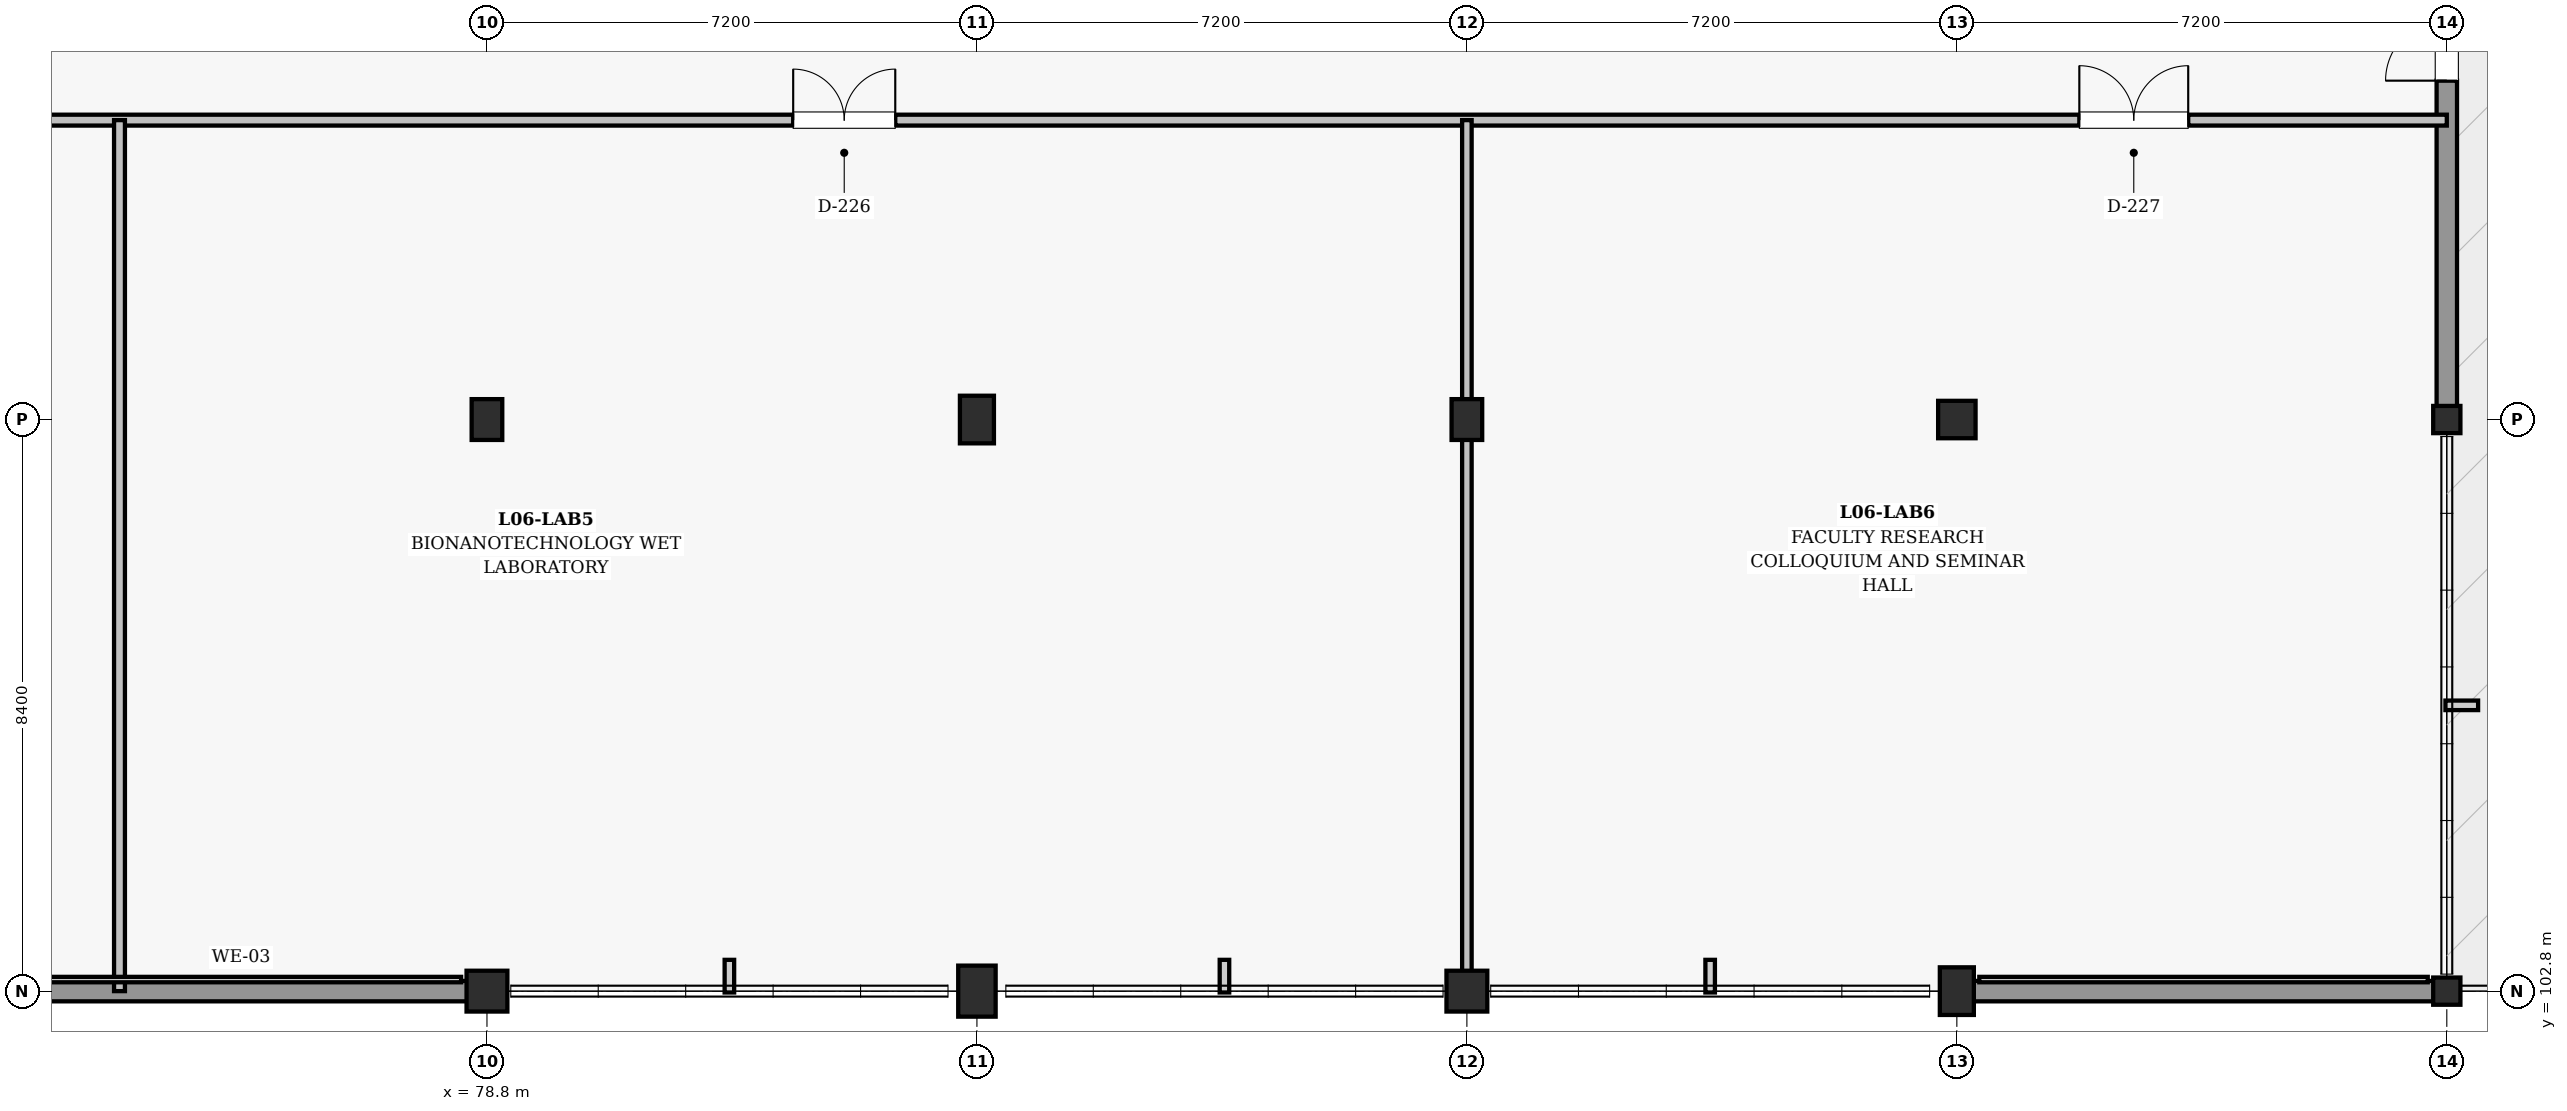
"""IFC4 building model, lengths in metres.
Left out: names, types, materials, properties, quantities, classifications, styles, units other than length and angle.
Written with IfcOpenShell. Run it as: python <this file> out.ifc"""

import sys

from ifc_helpers import new_model, si_unit, direction, frame, frame_2d, origin, origin_2d, place, context, subcontext, project, spatial, rectangle, extrude, element, fill, save


model = new_model("IFC4")
c1 = context("Model", 3, precision=1e-05, world=origin(), true_north=direction((0.0, 1.0)))
c2 = subcontext(c1, "Body", "Model", "MODEL_VIEW")
j1 = project(units=[si_unit("LENGTHUNIT", "METRE"), si_unit("PLANEANGLEUNIT", "RADIAN")], contexts=[c1])
p1 = place(None, origin())
s1 = spatial("IfcSite", under=j1, at=p1, CompositionType="ELEMENT")
p2 = place(p1, origin())
s2 = spatial("IfcBuilding", under=s1, at=p2, CompositionType="ELEMENT")
p3 = place(p2, frame((0.0, 0.0, 27.9)))
s3 = spatial("IfcBuildingStorey", under=s2, at=p3, CompositionType="ELEMENT", Elevation=27.9)
p4 = place(p3, frame((78.8, 102.8, 0.0), z_axis=(0.0, 0.0, 1.0), x_axis=(1.0, 0.0, 0.0)))
e1 = element("IfcColumn", 1, at=p4, inside=s3, PredefinedType="COLUMN", context=c2, shape_type="SweptSolid", body=[
    extrude(rectangle(XDim=0.6, YDim=0.6, at=origin_2d()), origin(), (0.0, 0.0, 1.0), 4.5),
])
p5 = place(p3, frame((78.8, 111.2, 0.0), z_axis=(0.0, 0.0, 1.0), x_axis=(1.0, 0.0, 0.0)))
e2 = element("IfcColumn", 2, at=p5, inside=s3, PredefinedType="COLUMN", context=c2, shape_type="SweptSolid", body=[
    extrude(rectangle(XDim=0.45, YDim=0.6, at=origin_2d()), origin(), (0.0, 0.0, 1.0), 4.5),
])
p6 = place(p3, frame((86.0, 102.8, 0.0), z_axis=(0.0, 0.0, 1.0), x_axis=(1.0, 0.0, 0.0)))
e3 = element("IfcColumn", 3, at=p6, inside=s3, PredefinedType="COLUMN", context=c2, shape_type="SweptSolid", body=[
    extrude(rectangle(XDim=0.55, YDim=0.75, at=origin_2d()), origin(), (0.0, 0.0, 1.0), 4.5),
])
p7 = place(p3, frame((86.0, 111.2, 0.0), z_axis=(0.0, 0.0, 1.0), x_axis=(1.0, 0.0, 0.0)))
e4 = element("IfcColumn", 4, at=p7, inside=s3, PredefinedType="COLUMN", context=c2, shape_type="SweptSolid", body=[
    extrude(rectangle(XDim=0.5, YDim=0.7, at=origin_2d()), origin(), (0.0, 0.0, 1.0), 4.5),
])
p8 = place(p3, frame((93.2, 102.8, 0.0), z_axis=(0.0, 0.0, 1.0), x_axis=(1.0, 0.0, 0.0)))
e5 = element("IfcColumn", 5, at=p8, inside=s3, PredefinedType="COLUMN", context=c2, shape_type="SweptSolid", body=[
    extrude(rectangle(XDim=0.6, YDim=0.6, at=origin_2d()), origin(), (0.0, 0.0, 1.0), 4.5),
])
p9 = place(p3, frame((93.2, 111.2, 0.0), z_axis=(0.0, 0.0, 1.0), x_axis=(1.0, 0.0, 0.0)))
e6 = element("IfcColumn", 6, at=p9, inside=s3, PredefinedType="COLUMN", context=c2, shape_type="SweptSolid", body=[
    extrude(rectangle(XDim=0.45, YDim=0.6, at=origin_2d()), origin(), (0.0, 0.0, 1.0), 4.5),
])
p10 = place(p3, frame((100.4, 102.8, 0.0), z_axis=(0.0, 0.0, 1.0), x_axis=(1.0, 0.0, 0.0)))
e7 = element("IfcColumn", 7, at=p10, inside=s3, PredefinedType="COLUMN", context=c2, shape_type="SweptSolid", body=[
    extrude(rectangle(XDim=0.5, YDim=0.7, at=origin_2d()), origin(), (0.0, 0.0, 1.0), 4.5),
])
p11 = place(p3, frame((100.4, 111.2, 0.0), z_axis=(0.0, 0.0, 1.0), x_axis=(1.0, 0.0, 0.0)))
e8 = element("IfcColumn", 8, at=p11, inside=s3, PredefinedType="COLUMN", context=c2, shape_type="SweptSolid", body=[
    extrude(rectangle(XDim=0.55, YDim=0.55, at=origin_2d()), origin(), (0.0, 0.0, 1.0), 4.5),
])
for number, where, z_axis, x_axis in (
    (9, (107.6, 102.8, 0.0), (0.0, 0.0, 1.0), (1.0, 0.0, 0.0)),
    (10, (107.6, 111.2, 0.0), (0.0, 0.0, 1.0), (1.0, 0.0, 0.0)),
):
    element("IfcColumn", number, at=place(p3, frame(where, z_axis=z_axis, x_axis=x_axis)), inside=s3, PredefinedType="COLUMN", context=c2, shape_type="SweptSolid", body=[
        extrude(rectangle(XDim=0.4, YDim=0.4, at=origin_2d()), origin(), (0.0, 0.0, 1.0), 4.5),
    ])
p12 = place(p3, frame((71.855, 102.8, 0.0), z_axis=(0.0, 0.0, 1.0), x_axis=(1.0, 0.0, 0.0)))
e11 = element("IfcWall", 11, at=p12, inside=s3, PredefinedType="SOLIDWALL", context=c2, shape_type="SweptSolid", body=[
    extrude(rectangle(XDim=6.665, YDim=0.3, at=frame_2d((3.333, 0.0))), origin(), (0.0, 0.0, 1.0), 2.955),
])
p13 = place(p3, frame((100.63, 102.8, 0.0), z_axis=(0.0, 0.0, 1.0), x_axis=(1.0, 0.0, 0.0)))
e12 = element("IfcWall", 12, at=p13, inside=s3, PredefinedType="SOLIDWALL", context=c2, shape_type="SweptSolid", body=[
    extrude(rectangle(XDim=6.79, YDim=0.3, at=frame_2d((3.395, 0.0))), origin(), (0.0, 0.0, 1.0), 2.955),
])
p14 = place(p3, frame((107.6, 111.38, 0.0), z_axis=(0.0, 0.0, 1.0), x_axis=(0.0, 1.0, 0.0)))
e13 = element("IfcWall", 13, at=p14, inside=s3, PredefinedType="SOLIDWALL", context=c2, shape_type="SweptSolid", body=[
    extrude(rectangle(XDim=8.015, YDim=0.3, at=frame_2d((4.008, 0.0))), origin(), (0.0, 0.0, 1.0), 2.955),
])
p15 = place(p14, frame((4.8, 0.0, 0.0)))
e14 = element("IfcOpeningElement", 14, at=p15, cuts=e13, PredefinedType="OPENING", context=c2, shape_type="SweptSolid", body=[
    extrude(rectangle(XDim=1.8, YDim=2.3, at=frame_2d((0.9, 1.15))), frame((0.0, 0.16, 0.0), z_axis=(0.0, -1.0, 0.0), x_axis=(1.0, 0.0, 0.0)), (0.0, 0.0, 1.0), 0.32),
])
p16 = place(p3, frame((14.0, 115.6, 0.0), z_axis=(0.0, 0.0, 1.0), x_axis=(1.0, 0.0, 0.0)))
e15 = element("IfcWall", 15, at=p16, inside=s3, PredefinedType="PARTITIONING", context=c2, shape_type="SweptSolid", body=[
    extrude(rectangle(XDim=93.6, YDim=0.16, at=frame_2d((46.8, 0.0))), origin(), (0.0, 0.0, 1.0), 2.96),
])
p17 = place(p16, frame((29.9, 0.0, 0.0)))
e16 = element("IfcOpeningElement", 16, at=p17, cuts=e15, PredefinedType="OPENING", context=c2, shape_type="SweptSolid", body=[
    extrude(rectangle(XDim=1.0, YDim=2.15, at=frame_2d((0.5, 1.075))), frame((0.0, 0.09, 0.0), z_axis=(0.0, -1.0, 0.0), x_axis=(1.0, 0.0, 0.0)), (0.0, 0.0, 1.0), 0.18),
])
p18 = place(p16, frame((10.1, 0.0, 0.0)))
e17 = element("IfcOpeningElement", 17, at=p18, cuts=e15, PredefinedType="OPENING", context=c2, shape_type="SweptSolid", body=[
    extrude(rectangle(XDim=1.5, YDim=2.25, at=frame_2d((0.75, 1.125))), frame((0.0, 0.09, 0.0), z_axis=(0.0, -1.0, 0.0), x_axis=(1.0, 0.0, 0.0)), (0.0, 0.0, 1.0), 0.18),
])
p19 = place(p16, frame((24.5, 0.0, 0.0)))
e18 = element("IfcOpeningElement", 18, at=p19, cuts=e15, PredefinedType="OPENING", context=c2, shape_type="SweptSolid", body=[
    extrude(rectangle(XDim=1.18, YDim=2.2, at=frame_2d((0.59, 1.1))), frame((0.0, 0.09, 0.0), z_axis=(0.0, -1.0, 0.0), x_axis=(1.0, 0.0, 0.0)), (0.0, 0.0, 1.0), 0.18),
])
p20 = place(p16, frame((38.7, 0.0, 0.0)))
e19 = element("IfcOpeningElement", 19, at=p20, cuts=e15, PredefinedType="OPENING", context=c2, shape_type="SweptSolid", body=[
    extrude(rectangle(XDim=1.5, YDim=2.25, at=frame_2d((0.75, 1.125))), frame((0.0, 0.09, 0.0), z_axis=(0.0, -1.0, 0.0), x_axis=(1.0, 0.0, 0.0)), (0.0, 0.0, 1.0), 0.18),
])
p21 = place(p16, frame((52.4, 0.0, 0.0)))
e20 = element("IfcOpeningElement", 20, at=p21, cuts=e15, PredefinedType="OPENING", context=c2, shape_type="SweptSolid", body=[
    extrude(rectangle(XDim=1.5, YDim=2.25, at=frame_2d((0.75, 1.125))), frame((0.0, 0.09, 0.0), z_axis=(0.0, -1.0, 0.0), x_axis=(1.0, 0.0, 0.0)), (0.0, 0.0, 1.0), 0.18),
])
p22 = place(p16, frame((69.3, 0.0, 0.0)))
e21 = element("IfcOpeningElement", 21, at=p22, cuts=e15, PredefinedType="OPENING", context=c2, shape_type="SweptSolid", body=[
    extrude(rectangle(XDim=1.5, YDim=2.25, at=frame_2d((0.75, 1.125))), frame((0.0, 0.09, 0.0), z_axis=(0.0, -1.0, 0.0), x_axis=(1.0, 0.0, 0.0)), (0.0, 0.0, 1.0), 0.18),
])
p23 = place(p16, frame((88.2, 0.0, 0.0)))
e22 = element("IfcOpeningElement", 22, at=p23, cuts=e15, PredefinedType="OPENING", context=c2, shape_type="SweptSolid", body=[
    extrude(rectangle(XDim=1.6, YDim=2.25, at=frame_2d((0.8, 1.125))), frame((0.0, 0.09, 0.0), z_axis=(0.0, -1.0, 0.0), x_axis=(1.0, 0.0, 0.0)), (0.0, 0.0, 1.0), 0.18),
])
p24 = place(p3, frame((73.4, 102.8, 0.0), z_axis=(0.0, 0.0, 1.0), x_axis=(0.0, 1.0, 0.0)))
e23 = element("IfcWall", 23, at=p24, inside=s3, PredefinedType="PARTITIONING", context=c2, shape_type="SweptSolid", body=[
    extrude(rectangle(XDim=12.8, YDim=0.16, at=frame_2d((6.4, 0.0))), origin(), (0.0, 0.0, 1.0), 3.36),
])
p25 = place(p3, frame((93.2, 102.8, 0.0), z_axis=(0.0, 0.0, 1.0), x_axis=(0.0, 1.0, 0.0)))
e24 = element("IfcWall", 24, at=p25, inside=s3, PredefinedType="PARTITIONING", context=c2, shape_type="SweptSolid", body=[
    extrude(rectangle(XDim=12.8, YDim=0.14, at=frame_2d((6.4, 0.0))), origin(), (0.0, 0.0, 1.0), 3.36),
])
p26 = place(p15, origin())
e25 = element("IfcDoor", 25, at=p26, inside=s3, OperationType="DOUBLE_DOOR_SINGLE_SWING", PredefinedType="DOOR", context=c2, shape_type="SweptSolid", body=[
    extrude(rectangle(XDim=1.8, YDim=2.3, at=frame_2d((0.9, 1.15))), frame((0.0, 0.025, 0.0), z_axis=(0.0, -1.0, 0.0), x_axis=(1.0, 0.0, 0.0)), (0.0, 0.0, 1.0), 0.05),
])
fill(e14, e25)
p27 = place(p22, origin())
e26 = element("IfcDoor", 26, at=p27, inside=s3, OperationType="DOUBLE_DOOR_SINGLE_SWING", PredefinedType="DOOR", context=c2, shape_type="SweptSolid", body=[
    extrude(rectangle(XDim=1.5, YDim=2.25, at=frame_2d((0.75, 1.125))), frame((0.0, 0.025, 0.0), z_axis=(0.0, -1.0, 0.0), x_axis=(1.0, 0.0, 0.0)), (0.0, 0.0, 1.0), 0.05),
])
fill(e21, e26)
p28 = place(p23, origin())
e27 = element("IfcDoor", 27, at=p28, inside=s3, OperationType="DOUBLE_DOOR_SINGLE_SWING", PredefinedType="DOOR", context=c2, shape_type="SweptSolid", body=[
    extrude(rectangle(XDim=1.6, YDim=2.25, at=frame_2d((0.8, 1.125))), frame((0.0, 0.025, 0.0), z_axis=(0.0, -1.0, 0.0), x_axis=(1.0, 0.0, 0.0)), (0.0, 0.0, 1.0), 0.05),
])
fill(e22, e27)
save(model, sys.argv[1])
